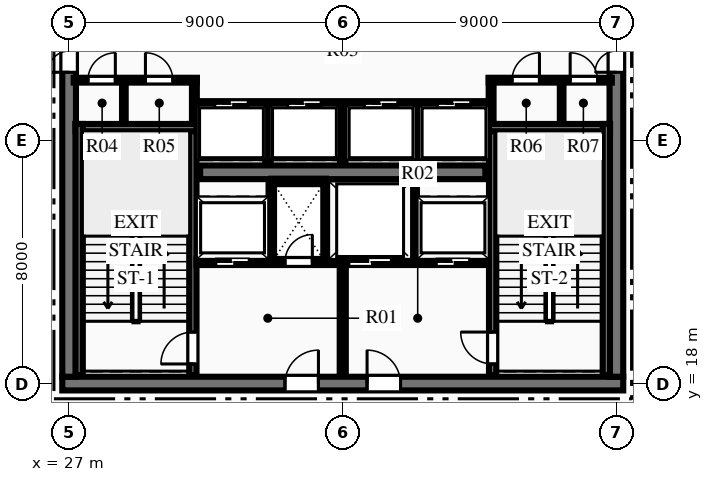
"""IFC4 building model, lengths in metres.
Left out: names, types, materials, properties, quantities, classifications, styles, units other than length and angle.
Written with IfcOpenShell. Run it as: python <this file> out.ifc"""

import sys

from ifc_helpers import new_model, si_unit, direction, frame, frame_2d, origin, place, context, subcontext, project, spatial, rectangle, extrude, element, fill, save


model = new_model("IFC4")
c1 = context("Model", 3, precision=1e-05, world=origin(), true_north=direction((0.0, 1.0)))
c2 = subcontext(c1, "Body", "Model", "MODEL_VIEW")
j1 = project(units=[si_unit("LENGTHUNIT", "METRE"), si_unit("PLANEANGLEUNIT", "RADIAN")], contexts=[c1])
p1 = place(None, origin())
s1 = spatial("IfcSite", under=j1, at=p1, CompositionType="ELEMENT")
p2 = place(p1, origin())
s2 = spatial("IfcBuilding", under=s1, at=p2, CompositionType="ELEMENT")
p3 = place(p2, frame((0.0, 0.0, 248.7)))
s3 = spatial("IfcBuildingStorey", under=s2, at=p3, CompositionType="ELEMENT", Elevation=248.7)
p4 = place(p3, frame((26.775, 18.0, 0.0), z_axis=(0.0, 0.0, 1.0), x_axis=(1.0, 0.0, 0.0)))
e1 = element("IfcWall", 1, at=p4, inside=s3, PredefinedType="SHEAR", context=c2, shape_type="SweptSolid", body=[
    extrude(rectangle(XDim=18.45, YDim=0.45, at=frame_2d((9.225, 0.0))), origin(), (0.0, 0.0, 1.0), 3.75),
])
p5 = place(p4, frame((7.325, 0.0, 0.0)))
e2 = element("IfcOpeningElement", 2, at=p5, cuts=e1, PredefinedType="OPENING", context=c2, shape_type="SweptSolid", body=[
    extrude(rectangle(XDim=1.1, YDim=2.15, at=frame_2d((0.55, 1.075))), frame((0.0, 0.235, 0.0), z_axis=(0.0, -1.0, 0.0), x_axis=(1.0, 0.0, 0.0)), (0.0, 0.0, 1.0), 0.47),
])
p6 = place(p4, frame((10.025, 0.0, 0.0)))
e3 = element("IfcOpeningElement", 3, at=p6, cuts=e1, PredefinedType="OPENING", context=c2, shape_type="SweptSolid", body=[
    extrude(rectangle(XDim=1.1, YDim=2.15, at=frame_2d((0.55, 1.075))), frame((0.0, 0.235, 0.0), z_axis=(0.0, -1.0, 0.0), x_axis=(1.0, 0.0, 0.0)), (0.0, 0.0, 1.0), 0.47),
])
p7 = place(p3, frame((27.0, 18.225, 0.0), z_axis=(0.0, 0.0, 1.0), x_axis=(0.0, 1.0, 0.0)))
e4 = element("IfcWall", 4, at=p7, inside=s3, PredefinedType="SHEAR", context=c2, shape_type="SweptSolid", body=[
    extrude(rectangle(XDim=15.55, YDim=0.45, at=frame_2d((7.775, 0.0))), origin(), (0.0, 0.0, 1.0), 3.75),
])
p8 = place(p7, frame((10.015, 0.0, 0.0)))
e5 = element("IfcOpeningElement", 5, at=p8, cuts=e4, PredefinedType="OPENING", context=c2, shape_type="SweptSolid", body=[
    extrude(rectangle(XDim=1.4, YDim=2.2, at=frame_2d((0.7, 1.1))), frame((0.0, 0.235, 0.0), z_axis=(0.0, -1.0, 0.0), x_axis=(1.0, 0.0, 0.0)), (0.0, 0.0, 1.0), 0.47),
])
p9 = place(p3, frame((45.0, 18.225, 0.0), z_axis=(0.0, 0.0, 1.0), x_axis=(0.0, 1.0, 0.0)))
e6 = element("IfcWall", 6, at=p9, inside=s3, PredefinedType="SHEAR", context=c2, shape_type="SweptSolid", body=[
    extrude(rectangle(XDim=15.55, YDim=0.45, at=frame_2d((7.775, 0.0))), origin(), (0.0, 0.0, 1.0), 3.75),
])
p10 = place(p9, frame((10.015, 0.0, 0.0)))
e7 = element("IfcOpeningElement", 7, at=p10, cuts=e6, PredefinedType="OPENING", context=c2, shape_type="SweptSolid", body=[
    extrude(rectangle(XDim=1.4, YDim=2.2, at=frame_2d((0.7, 1.1))), frame((0.0, 0.235, 0.0), z_axis=(0.0, -1.0, 0.0), x_axis=(1.0, 0.0, 0.0)), (0.0, 0.0, 1.0), 0.47),
])
p11 = place(p3, frame((31.31, 24.95, 0.0), z_axis=(0.0, 0.0, 1.0), x_axis=(1.0, 0.0, 0.0)))
e8 = element("IfcWall", 8, at=p11, inside=s3, PredefinedType="SHEAR", context=c2, shape_type="SweptSolid", body=[
    extrude(rectangle(XDim=9.38, YDim=0.45, at=frame_2d((4.69, 0.0))), origin(), (0.0, 0.0, 1.0), 3.75),
])
p12 = place(p3, frame((31.07, 18.28, 0.0), z_axis=(0.0, 0.0, 1.0), x_axis=(0.0, 1.0, 0.0)))
e9 = element("IfcWall", 9, at=p12, inside=s3, PredefinedType="SHEAR", context=c2, shape_type="SweptSolid", body=[
    extrude(rectangle(XDim=8.26, YDim=0.24, at=frame_2d((4.13, 0.0))), origin(), (0.0, 0.0, 1.0), 3.75),
])
p13 = place(p12, frame((0.365, 0.0, 0.0)))
e10 = element("IfcOpeningElement", 10, at=p13, cuts=e9, PredefinedType="OPENING", context=c2, shape_type="SweptSolid", body=[
    extrude(rectangle(XDim=1.05, YDim=2.15, at=frame_2d((0.525, 1.075))), frame((0.0, 0.13, 0.0), z_axis=(0.0, -1.0, 0.0), x_axis=(1.0, 0.0, 0.0)), (0.0, 0.0, 1.0), 0.26),
])
p14 = place(p3, frame((27.21, 26.42, 0.0), z_axis=(0.0, 0.0, 1.0), x_axis=(1.0, 0.0, 0.0)))
e11 = element("IfcWall", 11, at=p14, inside=s3, PredefinedType="SHEAR", context=c2, shape_type="SweptSolid", body=[
    extrude(rectangle(XDim=3.98, YDim=0.24, at=frame_2d((1.99, 0.0))), origin(), (0.0, 0.0, 1.0), 3.75),
])
p15 = place(p3, frame((27.33, 18.28, 0.0), z_axis=(0.0, 0.0, 1.0), x_axis=(0.0, 1.0, 0.0)))
e12 = element("IfcWall", 12, at=p15, inside=s3, PredefinedType="SHEAR", context=c2, shape_type="SweptSolid", body=[
    extrude(rectangle(XDim=8.26, YDim=0.24, at=frame_2d((4.13, 0.0))), origin(), (0.0, 0.0, 1.0), 3.75),
])
p16 = place(p3, frame((40.93, 18.28, 0.0), z_axis=(0.0, 0.0, 1.0), x_axis=(0.0, 1.0, 0.0)))
e13 = element("IfcWall", 13, at=p16, inside=s3, PredefinedType="SHEAR", context=c2, shape_type="SweptSolid", body=[
    extrude(rectangle(XDim=8.26, YDim=0.24, at=frame_2d((4.13, 0.0))), origin(), (0.0, 0.0, 1.0), 3.75),
])
p17 = place(p16, frame((0.365, 0.0, 0.0)))
e14 = element("IfcOpeningElement", 14, at=p17, cuts=e13, PredefinedType="OPENING", context=c2, shape_type="SweptSolid", body=[
    extrude(rectangle(XDim=1.05, YDim=2.15, at=frame_2d((0.525, 1.075))), frame((0.0, 0.13, 0.0), z_axis=(0.0, -1.0, 0.0), x_axis=(1.0, 0.0, 0.0)), (0.0, 0.0, 1.0), 0.26),
])
p18 = place(p3, frame((40.81, 26.42, 0.0), z_axis=(0.0, 0.0, 1.0), x_axis=(1.0, 0.0, 0.0)))
e15 = element("IfcWall", 15, at=p18, inside=s3, PredefinedType="SHEAR", context=c2, shape_type="SweptSolid", body=[
    extrude(rectangle(XDim=3.98, YDim=0.24, at=frame_2d((1.99, 0.0))), origin(), (0.0, 0.0, 1.0), 3.75),
])
p19 = place(p3, frame((44.67, 18.28, 0.0), z_axis=(0.0, 0.0, 1.0), x_axis=(0.0, 1.0, 0.0)))
e16 = element("IfcWall", 16, at=p19, inside=s3, PredefinedType="SHEAR", context=c2, shape_type="SweptSolid", body=[
    extrude(rectangle(XDim=8.26, YDim=0.24, at=frame_2d((4.13, 0.0))), origin(), (0.0, 0.0, 1.0), 3.75),
])
p20 = place(p3, frame((36.0, 18.28, 0.0), z_axis=(0.0, 0.0, 1.0), x_axis=(0.0, 1.0, 0.0)))
e17 = element("IfcWall", 17, at=p20, inside=s3, PredefinedType="PARTITIONING", context=c2, shape_type="SweptSolid", body=[
    extrude(rectangle(XDim=3.77, YDim=0.2, at=frame_2d((1.885, 0.0))), origin(), (0.0, 0.0, 1.0), 3.48),
])
p21 = place(p3, frame((31.19, 22.0, 0.0), z_axis=(0.0, 0.0, 1.0), x_axis=(1.0, 0.0, 0.0)))
e18 = element("IfcWall", 18, at=p21, inside=s3, PredefinedType="PARTITIONING", context=c2, shape_type="SweptSolid", body=[
    extrude(rectangle(XDim=4.69, YDim=0.2, at=frame_2d((2.345, 0.0))), origin(), (0.0, 0.0, 1.0), 3.48),
])
p22 = place(p21, frame((2.91, 0.0, 0.0)))
e19 = element("IfcOpeningElement", 19, at=p22, cuts=e18, PredefinedType="OPENING", context=c2, shape_type="SweptSolid", body=[
    extrude(rectangle(XDim=0.9, YDim=2.15, at=frame_2d((0.45, 1.075))), frame((0.0, 0.11, 0.0), z_axis=(0.0, -1.0, 0.0), x_axis=(1.0, 0.0, 0.0)), (0.0, 0.0, 1.0), 0.22),
])
p23 = place(p21, frame((0.635, 0.0, 0.0)))
e20 = element("IfcOpeningElement", 20, at=p23, cuts=e18, PredefinedType="OPENING", context=c2, shape_type="SweptSolid", body=[
    extrude(rectangle(XDim=1.1, YDim=2.15, at=frame_2d((0.55, 1.075))), frame((0.0, 0.11, 0.0), z_axis=(0.0, -1.0, 0.0), x_axis=(1.0, 0.0, 0.0)), (0.0, 0.0, 1.0), 0.22),
])
p24 = place(p3, frame((36.12, 22.0, 0.0), z_axis=(0.0, 0.0, 1.0), x_axis=(1.0, 0.0, 0.0)))
e21 = element("IfcWall", 21, at=p24, inside=s3, PredefinedType="PARTITIONING", context=c2, shape_type="SweptSolid", body=[
    extrude(rectangle(XDim=4.69, YDim=0.2, at=frame_2d((2.345, 0.0))), origin(), (0.0, 0.0, 1.0), 3.48),
])
p25 = place(p24, frame((2.955, 0.0, 0.0)))
e22 = element("IfcOpeningElement", 22, at=p25, cuts=e21, PredefinedType="OPENING", context=c2, shape_type="SweptSolid", body=[
    extrude(rectangle(XDim=1.1, YDim=2.15, at=frame_2d((0.55, 1.075))), frame((0.0, 0.11, 0.0), z_axis=(0.0, -1.0, 0.0), x_axis=(1.0, 0.0, 0.0)), (0.0, 0.0, 1.0), 0.22),
])
p26 = place(p24, frame((0.08, 0.0, 0.0)))
e23 = element("IfcOpeningElement", 23, at=p26, cuts=e21, PredefinedType="OPENING", context=c2, shape_type="SweptSolid", body=[
    extrude(rectangle(XDim=1.4, YDim=2.2, at=frame_2d((0.7, 1.1))), frame((0.0, 0.11, 0.0), z_axis=(0.0, -1.0, 0.0), x_axis=(1.0, 0.0, 0.0)), (0.0, 0.0, 1.0), 0.22),
])
for number, where, z_axis, x_axis in (
    (24, (33.65, 22.05, 0.0), (0.0, 0.0, 1.0), (0.0, 1.0, 0.0)),
    (25, (35.45, 22.05, 0.0), (0.0, 0.0, 1.0), (0.0, 1.0, 0.0)),
):
    element("IfcWall", number, at=place(p3, frame(where, z_axis=z_axis, x_axis=x_axis)), inside=s3, PredefinedType="PARTITIONING", context=c2, shape_type="SweptSolid", body=[
        extrude(rectangle(XDim=2.6, YDim=0.18, at=frame_2d((1.3, 0.0))), origin(), (0.0, 0.0, 1.0), 3.48),
    ])
p27 = place(p3, frame((33.65, 24.65, 0.0), z_axis=(0.0, 0.0, 1.0), x_axis=(1.0, 0.0, 0.0)))
e26 = element("IfcWall", 26, at=p27, inside=s3, PredefinedType="PARTITIONING", context=c2, shape_type="SweptSolid", body=[
    extrude(rectangle(XDim=1.8, YDim=0.18, at=frame_2d((0.9, 0.0))), origin(), (0.0, 0.0, 1.0), 3.48),
])
p28 = place(p3, frame((38.35, 22.05, 0.0), z_axis=(0.0, 0.0, 1.0), x_axis=(0.0, 1.0, 0.0)))
e27 = element("IfcWall", 27, at=p28, inside=s3, PredefinedType="PARTITIONING", context=c2, shape_type="SweptSolid", body=[
    extrude(rectangle(XDim=2.6, YDim=0.18, at=frame_2d((1.3, 0.0))), origin(), (0.0, 0.0, 1.0), 3.48),
])
p29 = place(p3, frame((27.15, 27.98, 0.0), z_axis=(0.0, 0.0, 1.0), x_axis=(1.0, 0.0, 0.0)))
e28 = element("IfcWall", 28, at=p29, inside=s3, PredefinedType="PARTITIONING", context=c2, shape_type="SweptSolid", body=[
    extrude(rectangle(XDim=4.05, YDim=0.16, at=frame_2d((2.025, 0.0))), origin(), (0.0, 0.0, 1.0), 3.48),
])
p30 = place(p29, frame((0.47, 0.0, 0.0)))
e29 = element("IfcOpeningElement", 29, at=p30, cuts=e28, PredefinedType="OPENING", context=c2, shape_type="SweptSolid", body=[
    extrude(rectangle(XDim=0.9, YDim=2.15, at=frame_2d((0.45, 1.075))), frame((0.0, 0.09, 0.0), z_axis=(0.0, -1.0, 0.0), x_axis=(1.0, 0.0, 0.0)), (0.0, 0.0, 1.0), 0.18),
])
p31 = place(p29, frame((2.36, 0.0, 0.0)))
e30 = element("IfcOpeningElement", 30, at=p31, cuts=e28, PredefinedType="OPENING", context=c2, shape_type="SweptSolid", body=[
    extrude(rectangle(XDim=0.9, YDim=2.15, at=frame_2d((0.45, 1.075))), frame((0.0, 0.09, 0.0), z_axis=(0.0, -1.0, 0.0), x_axis=(1.0, 0.0, 0.0)), (0.0, 0.0, 1.0), 0.18),
])
p32 = place(p3, frame((31.12, 26.54, 0.0), z_axis=(0.0, 0.0, 1.0), x_axis=(0.0, 1.0, 0.0)))
e31 = element("IfcWall", 31, at=p32, inside=s3, PredefinedType="PARTITIONING", context=c2, shape_type="SweptSolid", body=[
    extrude(rectangle(XDim=1.51, YDim=0.16, at=frame_2d((0.755, 0.0))), origin(), (0.0, 0.0, 1.0), 3.48),
])
p33 = place(p3, frame((40.8, 27.98, 0.0), z_axis=(0.0, 0.0, 1.0), x_axis=(1.0, 0.0, 0.0)))
e32 = element("IfcWall", 32, at=p33, inside=s3, PredefinedType="PARTITIONING", context=c2, shape_type="SweptSolid", body=[
    extrude(rectangle(XDim=4.05, YDim=0.16, at=frame_2d((2.025, 0.0))), origin(), (0.0, 0.0, 1.0), 3.48),
])
p34 = place(p33, frame((0.77, 0.0, 0.0)))
e33 = element("IfcOpeningElement", 33, at=p34, cuts=e32, PredefinedType="OPENING", context=c2, shape_type="SweptSolid", body=[
    extrude(rectangle(XDim=0.9, YDim=2.15, at=frame_2d((0.45, 1.075))), frame((0.0, 0.09, 0.0), z_axis=(0.0, -1.0, 0.0), x_axis=(1.0, 0.0, 0.0)), (0.0, 0.0, 1.0), 0.18),
])
p35 = place(p33, frame((2.68, 0.0, 0.0)))
e34 = element("IfcOpeningElement", 34, at=p35, cuts=e32, PredefinedType="OPENING", context=c2, shape_type="SweptSolid", body=[
    extrude(rectangle(XDim=0.9, YDim=2.15, at=frame_2d((0.45, 1.075))), frame((0.0, 0.09, 0.0), z_axis=(0.0, -1.0, 0.0), x_axis=(1.0, 0.0, 0.0)), (0.0, 0.0, 1.0), 0.18),
])
p36 = place(p3, frame((40.88, 26.54, 0.0), z_axis=(0.0, 0.0, 1.0), x_axis=(0.0, 1.0, 0.0)))
e35 = element("IfcWall", 35, at=p36, inside=s3, PredefinedType="PARTITIONING", context=c2, shape_type="SweptSolid", body=[
    extrude(rectangle(XDim=1.51, YDim=0.16, at=frame_2d((0.755, 0.0))), origin(), (0.0, 0.0, 1.0), 3.48),
])
for number, where, z_axis, x_axis in (
    (36, (28.8, 26.54, 0.0), (0.0, 0.0, 1.0), (0.0, 1.0, 0.0)),
    (37, (43.2, 26.54, 0.0), (0.0, 0.0, 1.0), (0.0, 1.0, 0.0)),
):
    element("IfcWall", number, at=place(p3, frame(where, z_axis=z_axis, x_axis=x_axis)), inside=s3, PredefinedType="PARTITIONING", context=c2, shape_type="SweptSolid", body=[
        extrude(rectangle(XDim=1.44, YDim=0.12, at=frame_2d((0.72, 0.0))), origin(), (0.0, 0.0, 1.0), 3.48),
    ])
p37 = place(p3, frame((31.2, 27.2, 0.0), z_axis=(0.0, 0.0, 1.0), x_axis=(1.0, 0.0, 0.0)))
e38 = element("IfcWall", 38, at=p37, inside=s3, PredefinedType="PARTITIONING", context=c2, shape_type="SweptSolid", body=[
    extrude(rectangle(XDim=9.6, YDim=0.18, at=frame_2d((4.8, 0.0))), origin(), (0.0, 0.0, 1.0), 3.48),
])
p38 = place(p37, frame((0.59, 0.0, 0.0)))
e39 = element("IfcOpeningElement", 39, at=p38, cuts=e38, PredefinedType="OPENING", context=c2, shape_type="SweptSolid", body=[
    extrude(rectangle(XDim=1.1, YDim=2.15, at=frame_2d((0.55, 1.075))), frame((0.0, 0.1, 0.0), z_axis=(0.0, -1.0, 0.0), x_axis=(1.0, 0.0, 0.0)), (0.0, 0.0, 1.0), 0.2),
])
p39 = place(p37, frame((2.99, 0.0, 0.0)))
e40 = element("IfcOpeningElement", 40, at=p39, cuts=e38, PredefinedType="OPENING", context=c2, shape_type="SweptSolid", body=[
    extrude(rectangle(XDim=1.1, YDim=2.15, at=frame_2d((0.55, 1.075))), frame((0.0, 0.1, 0.0), z_axis=(0.0, -1.0, 0.0), x_axis=(1.0, 0.0, 0.0)), (0.0, 0.0, 1.0), 0.2),
])
p40 = place(p37, frame((5.51, 0.0, 0.0)))
e41 = element("IfcOpeningElement", 41, at=p40, cuts=e38, PredefinedType="OPENING", context=c2, shape_type="SweptSolid", body=[
    extrude(rectangle(XDim=1.1, YDim=2.15, at=frame_2d((0.55, 1.075))), frame((0.0, 0.1, 0.0), z_axis=(0.0, -1.0, 0.0), x_axis=(1.0, 0.0, 0.0)), (0.0, 0.0, 1.0), 0.2),
])
p41 = place(p37, frame((7.91, 0.0, 0.0)))
e42 = element("IfcOpeningElement", 42, at=p41, cuts=e38, PredefinedType="OPENING", context=c2, shape_type="SweptSolid", body=[
    extrude(rectangle(XDim=1.1, YDim=2.15, at=frame_2d((0.55, 1.075))), frame((0.0, 0.1, 0.0), z_axis=(0.0, -1.0, 0.0), x_axis=(1.0, 0.0, 0.0)), (0.0, 0.0, 1.0), 0.2),
])
for number, where, z_axis, x_axis in (
    (43, (33.54, 25.3, 0.0), (0.0, 0.0, 1.0), (0.0, 1.0, 0.0)),
    (44, (36.0, 25.3, 0.0), (0.0, 0.0, 1.0), (0.0, 1.0, 0.0)),
    (45, (38.46, 25.3, 0.0), (0.0, 0.0, 1.0), (0.0, 1.0, 0.0)),
):
    element("IfcWall", number, at=place(p3, frame(where, z_axis=z_axis, x_axis=x_axis)), inside=s3, PredefinedType="PARTITIONING", context=c2, shape_type="SweptSolid", body=[
        extrude(rectangle(XDim=1.9, YDim=0.18, at=frame_2d((0.95, 0.0))), origin(), (0.0, 0.0, 1.0), 3.48),
    ])
p42 = place(p30, origin())
e46 = element("IfcDoor", 46, at=p42, inside=s3, OperationType="SINGLE_SWING_RIGHT", PredefinedType="DOOR", context=c2, shape_type="SweptSolid", body=[
    extrude(rectangle(XDim=0.9, YDim=2.15, at=frame_2d((0.45, 1.075))), frame((0.0, 0.025, 0.0), z_axis=(0.0, -1.0, 0.0), x_axis=(1.0, 0.0, 0.0)), (0.0, 0.0, 1.0), 0.05),
])
fill(e29, e46)
p43 = place(p31, origin())
e47 = element("IfcDoor", 47, at=p43, inside=s3, OperationType="SINGLE_SWING_LEFT", PredefinedType="DOOR", context=c2, shape_type="SweptSolid", body=[
    extrude(rectangle(XDim=0.9, YDim=2.15, at=frame_2d((0.45, 1.075))), frame((0.0, 0.025, 0.0), z_axis=(0.0, -1.0, 0.0), x_axis=(1.0, 0.0, 0.0)), (0.0, 0.0, 1.0), 0.05),
])
fill(e30, e47)
p44 = place(p34, origin())
e48 = element("IfcDoor", 48, at=p44, inside=s3, OperationType="SINGLE_SWING_RIGHT", PredefinedType="DOOR", context=c2, shape_type="SweptSolid", body=[
    extrude(rectangle(XDim=0.9, YDim=2.15, at=frame_2d((0.45, 1.075))), frame((0.0, 0.025, 0.0), z_axis=(0.0, -1.0, 0.0), x_axis=(1.0, 0.0, 0.0)), (0.0, 0.0, 1.0), 0.05),
])
fill(e33, e48)
p45 = place(p35, origin())
e49 = element("IfcDoor", 49, at=p45, inside=s3, OperationType="SINGLE_SWING_LEFT", PredefinedType="DOOR", context=c2, shape_type="SweptSolid", body=[
    extrude(rectangle(XDim=0.9, YDim=2.15, at=frame_2d((0.45, 1.075))), frame((0.0, 0.025, 0.0), z_axis=(0.0, -1.0, 0.0), x_axis=(1.0, 0.0, 0.0)), (0.0, 0.0, 1.0), 0.05),
])
fill(e34, e49)
p46 = place(p13, origin())
e50 = element("IfcDoor", 50, at=p46, inside=s3, OperationType="SINGLE_SWING_LEFT", PredefinedType="DOOR", context=c2, shape_type="SweptSolid", body=[
    extrude(rectangle(XDim=1.05, YDim=2.15, at=frame_2d((0.525, 1.075))), frame((0.0, 0.025, 0.0), z_axis=(0.0, -1.0, 0.0), x_axis=(1.0, 0.0, 0.0)), (0.0, 0.0, 1.0), 0.05),
])
fill(e10, e50)
p47 = place(p17, origin())
e51 = element("IfcDoor", 51, at=p47, inside=s3, OperationType="SINGLE_SWING_RIGHT", PredefinedType="DOOR", context=c2, shape_type="SweptSolid", body=[
    extrude(rectangle(XDim=1.05, YDim=2.15, at=frame_2d((0.525, 1.075))), frame((0.0, 0.025, 0.0), z_axis=(0.0, -1.0, 0.0), x_axis=(1.0, 0.0, 0.0)), (0.0, 0.0, 1.0), 0.05),
])
fill(e14, e51)
p48 = place(p5, origin())
e52 = element("IfcDoor", 52, at=p48, inside=s3, OperationType="SINGLE_SWING_RIGHT", PredefinedType="DOOR", context=c2, shape_type="SweptSolid", body=[
    extrude(rectangle(XDim=1.1, YDim=2.15, at=frame_2d((0.55, 1.075))), frame((0.0, 0.025, 0.0), z_axis=(0.0, -1.0, 0.0), x_axis=(1.0, 0.0, 0.0)), (0.0, 0.0, 1.0), 0.05),
])
fill(e2, e52)
p49 = place(p6, origin())
e53 = element("IfcDoor", 53, at=p49, inside=s3, OperationType="SINGLE_SWING_LEFT", PredefinedType="DOOR", context=c2, shape_type="SweptSolid", body=[
    extrude(rectangle(XDim=1.1, YDim=2.15, at=frame_2d((0.55, 1.075))), frame((0.0, 0.025, 0.0), z_axis=(0.0, -1.0, 0.0), x_axis=(1.0, 0.0, 0.0)), (0.0, 0.0, 1.0), 0.05),
])
fill(e3, e53)
p50 = place(p22, origin())
e54 = element("IfcDoor", 54, at=p50, inside=s3, OperationType="SINGLE_SWING_RIGHT", PredefinedType="DOOR", context=c2, shape_type="SweptSolid", body=[
    extrude(rectangle(XDim=0.9, YDim=2.15, at=frame_2d((0.45, 1.075))), frame((0.0, 0.025, 0.0), z_axis=(0.0, -1.0, 0.0), x_axis=(1.0, 0.0, 0.0)), (0.0, 0.0, 1.0), 0.05),
])
fill(e19, e54)
p51 = place(p8, origin())
e55 = element("IfcDoor", 55, at=p51, inside=s3, OperationType="DOUBLE_DOOR_SINGLE_SWING", PredefinedType="DOOR", context=c2, shape_type="SweptSolid", body=[
    extrude(rectangle(XDim=1.4, YDim=2.2, at=frame_2d((0.7, 1.1))), frame((0.0, 0.025, 0.0), z_axis=(0.0, -1.0, 0.0), x_axis=(1.0, 0.0, 0.0)), (0.0, 0.0, 1.0), 0.05),
])
fill(e5, e55)
p52 = place(p10, origin())
e56 = element("IfcDoor", 56, at=p52, inside=s3, OperationType="DOUBLE_DOOR_SINGLE_SWING", PredefinedType="DOOR", context=c2, shape_type="SweptSolid", body=[
    extrude(rectangle(XDim=1.4, YDim=2.2, at=frame_2d((0.7, 1.1))), frame((0.0, 0.025, 0.0), z_axis=(0.0, -1.0, 0.0), x_axis=(1.0, 0.0, 0.0)), (0.0, 0.0, 1.0), 0.05),
])
fill(e7, e56)
p53 = place(p38, origin())
e57 = element("IfcDoor", 57, at=p53, inside=s3, OperationType="SLIDING_TO_LEFT", PredefinedType="DOOR", context=c2, shape_type="SweptSolid", body=[
    extrude(rectangle(XDim=1.1, YDim=2.15, at=frame_2d((0.55, 1.075))), frame((0.0, 0.025, 0.0), z_axis=(0.0, -1.0, 0.0), x_axis=(1.0, 0.0, 0.0)), (0.0, 0.0, 1.0), 0.05),
])
fill(e39, e57)
p54 = place(p39, origin())
e58 = element("IfcDoor", 58, at=p54, inside=s3, OperationType="SLIDING_TO_LEFT", PredefinedType="DOOR", context=c2, shape_type="SweptSolid", body=[
    extrude(rectangle(XDim=1.1, YDim=2.15, at=frame_2d((0.55, 1.075))), frame((0.0, 0.025, 0.0), z_axis=(0.0, -1.0, 0.0), x_axis=(1.0, 0.0, 0.0)), (0.0, 0.0, 1.0), 0.05),
])
fill(e40, e58)
p55 = place(p40, origin())
e59 = element("IfcDoor", 59, at=p55, inside=s3, OperationType="SLIDING_TO_LEFT", PredefinedType="DOOR", context=c2, shape_type="SweptSolid", body=[
    extrude(rectangle(XDim=1.1, YDim=2.15, at=frame_2d((0.55, 1.075))), frame((0.0, 0.025, 0.0), z_axis=(0.0, -1.0, 0.0), x_axis=(1.0, 0.0, 0.0)), (0.0, 0.0, 1.0), 0.05),
])
fill(e41, e59)
p56 = place(p41, origin())
e60 = element("IfcDoor", 60, at=p56, inside=s3, OperationType="SLIDING_TO_LEFT", PredefinedType="DOOR", context=c2, shape_type="SweptSolid", body=[
    extrude(rectangle(XDim=1.1, YDim=2.15, at=frame_2d((0.55, 1.075))), frame((0.0, 0.025, 0.0), z_axis=(0.0, -1.0, 0.0), x_axis=(1.0, 0.0, 0.0)), (0.0, 0.0, 1.0), 0.05),
])
fill(e42, e60)
p57 = place(p23, origin())
e61 = element("IfcDoor", 61, at=p57, inside=s3, OperationType="SLIDING_TO_LEFT", PredefinedType="DOOR", context=c2, shape_type="SweptSolid", body=[
    extrude(rectangle(XDim=1.1, YDim=2.15, at=frame_2d((0.55, 1.075))), frame((0.0, 0.025, 0.0), z_axis=(0.0, -1.0, 0.0), x_axis=(1.0, 0.0, 0.0)), (0.0, 0.0, 1.0), 0.05),
])
fill(e20, e61)
p58 = place(p25, origin())
e62 = element("IfcDoor", 62, at=p58, inside=s3, OperationType="SLIDING_TO_LEFT", PredefinedType="DOOR", context=c2, shape_type="SweptSolid", body=[
    extrude(rectangle(XDim=1.1, YDim=2.15, at=frame_2d((0.55, 1.075))), frame((0.0, 0.025, 0.0), z_axis=(0.0, -1.0, 0.0), x_axis=(1.0, 0.0, 0.0)), (0.0, 0.0, 1.0), 0.05),
])
fill(e22, e62)
p59 = place(p26, origin())
e63 = element("IfcDoor", 63, at=p59, inside=s3, OperationType="SLIDING_TO_LEFT", PredefinedType="DOOR", context=c2, shape_type="SweptSolid", body=[
    extrude(rectangle(XDim=1.4, YDim=2.2, at=frame_2d((0.7, 1.1))), frame((0.0, 0.025, 0.0), z_axis=(0.0, -1.0, 0.0), x_axis=(1.0, 0.0, 0.0)), (0.0, 0.0, 1.0), 0.05),
])
fill(e23, e63)
save(model, sys.argv[1])
